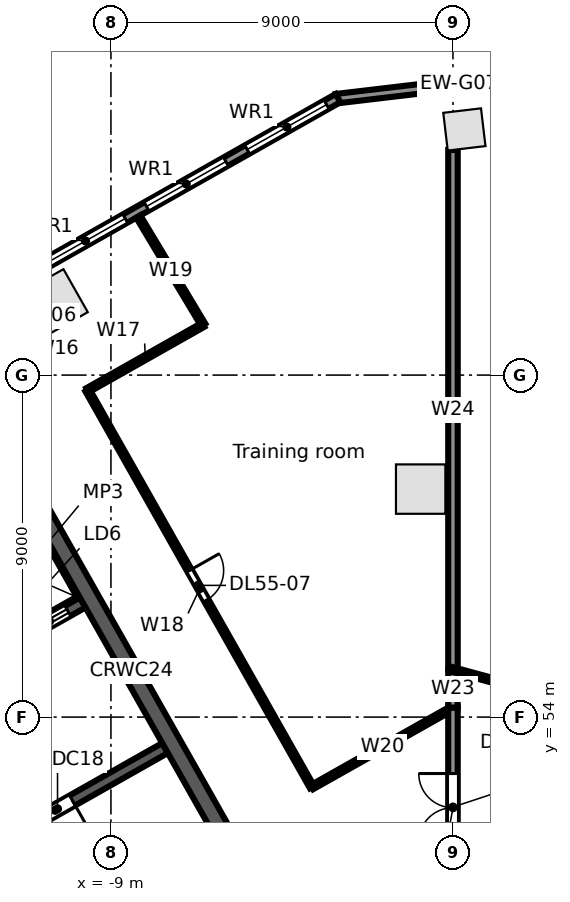
"""IFC4 building model, lengths in metres.
Left out: names, types, materials, properties, quantities, classifications, styles, units other than length and angle.
Written with IfcOpenShell. Run it as: python <this file> out.ifc"""

import sys

from ifc_helpers import new_model, si_unit, direction, frame, frame_2d, origin, origin_2d, place, context, subcontext, project, spatial, rectangle, extrude, element, fill, save


model = new_model("IFC4")
c1 = context("Model", 3, precision=1e-05, world=origin(), true_north=direction((0.0, 1.0)))
c2 = subcontext(c1, "Body", "Model", "MODEL_VIEW")
j1 = project(units=[si_unit("LENGTHUNIT", "METRE"), si_unit("PLANEANGLEUNIT", "RADIAN")], contexts=[c1])
p1 = place(None, origin())
s1 = spatial("IfcSite", under=j1, at=p1, CompositionType="ELEMENT")
p2 = place(p1, origin())
s2 = spatial("IfcBuilding", under=s1, at=p2, CompositionType="ELEMENT")
p3 = place(p2, frame((0.0, 0.0, 250.4)))
s3 = spatial("IfcBuildingStorey", under=s2, at=p3, CompositionType="ELEMENT", Elevation=250.4)
p4 = place(p3, frame((0.3, 69.464, 0.0), z_axis=(0.0, 0.0, 1.0), x_axis=(-0.993068456955, -0.117537397458, 0.0)))
e1 = element("IfcColumn", 1, at=p4, inside=s3, PredefinedType="COLUMN", context=c2, shape_type="SweptSolid", body=[
    extrude(rectangle(XDim=1.0, YDim=1.0, at=origin_2d()), origin(), (0.0, 0.0, 1.0), 3.9),
])
for number, where, z_axis, x_axis in (
    (2, (-10.495, 64.902, 0.0), (0.0, 0.0, 1.0), (-0.87, -0.492, 0.0)),
    (3, (-0.85, 60.0, 0.0), (0.0, 0.0, 1.0), (0.0, 1.0, 0.0)),
):
    element("IfcColumn", number, at=place(p3, frame(where, z_axis=z_axis, x_axis=x_axis)), inside=s3, PredefinedType="COLUMN", context=c2, shape_type="SweptSolid", body=[
        extrude(rectangle(XDim=1.3, YDim=1.3, at=origin_2d()), origin(), (0.0, 0.0, 1.0), 3.9),
    ])
p5 = place(p3, frame((-3.071, 70.273, 0.0), z_axis=(0.0, 0.0, 1.0), x_axis=(0.993064524962, 0.11757061394, 0.0)))
e4 = element("IfcWall", 4, at=p5, inside=s3, PredefinedType="STANDARD", context=c2, shape_type="SweptSolid", body=[
    extrude(rectangle(XDim=6.506, YDim=0.25, at=frame_2d((3.253, 0.0))), origin(), (0.0, 0.0, 1.0), 3.62),
])
p6 = place(p3, frame((-58.732, 38.771, 0.0), z_axis=(0.0, 0.0, 1.0), x_axis=(0.870354824205, 0.492425100887, 0.0)))
e5 = element("IfcWall", 5, at=p6, inside=s3, PredefinedType="STANDARD", context=c2, shape_type="SweptSolid", body=[
    extrude(rectangle(XDim=64.006, YDim=0.25, at=frame_2d((32.003, 0.0))), origin(), (0.0, 0.0, 1.0), 3.62),
])
p7 = place(p6, frame((61.259, 0.0, 0.8)))
e6 = element("IfcOpeningElement", 6, at=p7, cuts=e5, PredefinedType="OPENING", context=c2, shape_type="SweptSolid", body=[
    extrude(rectangle(XDim=2.4, YDim=2.2, at=frame_2d((1.2, 1.1))), frame((0.0, 0.135, 0.0), z_axis=(0.0, -1.0, 0.0), x_axis=(1.0, 0.0, 0.0)), (0.0, 0.0, 1.0), 0.27),
])
p8 = place(p6, frame((58.216, 0.0, 0.8)))
e7 = element("IfcOpeningElement", 7, at=p8, cuts=e5, PredefinedType="OPENING", context=c2, shape_type="SweptSolid", body=[
    extrude(rectangle(XDim=2.4, YDim=2.2, at=frame_2d((1.2, 1.1))), frame((0.0, 0.135, 0.0), z_axis=(0.0, -1.0, 0.0), x_axis=(1.0, 0.0, 0.0)), (0.0, 0.0, 1.0), 0.27),
])
p9 = place(p6, frame((55.173, 0.0, 0.8)))
e8 = element("IfcOpeningElement", 8, at=p9, cuts=e5, PredefinedType="OPENING", context=c2, shape_type="SweptSolid", body=[
    extrude(rectangle(XDim=2.4, YDim=2.2, at=frame_2d((1.2, 1.1))), frame((0.0, 0.135, 0.0), z_axis=(0.0, -1.0, 0.0), x_axis=(1.0, 0.0, 0.0)), (0.0, 0.0, 1.0), 0.27),
])
p10 = place(p6, frame((52.129, 0.0, 0.8)))
e9 = element("IfcOpeningElement", 9, at=p10, cuts=e5, PredefinedType="OPENING", context=c2, shape_type="SweptSolid", body=[
    extrude(rectangle(XDim=2.4, YDim=2.2, at=frame_2d((1.2, 1.1))), frame((0.0, 0.135, 0.0), z_axis=(0.0, -1.0, 0.0), x_axis=(1.0, 0.0, 0.0)), (0.0, 0.0, 1.0), 0.27),
])
p11 = place(p6, frame((49.086, 0.0, 0.8)))
e10 = element("IfcOpeningElement", 10, at=p11, cuts=e5, PredefinedType="OPENING", context=c2, shape_type="SweptSolid", body=[
    extrude(rectangle(XDim=2.4, YDim=2.2, at=frame_2d((1.2, 1.1))), frame((0.0, 0.135, 0.0), z_axis=(0.0, -1.0, 0.0), x_axis=(1.0, 0.0, 0.0)), (0.0, 0.0, 1.0), 0.27),
])
p12 = place(p6, frame((46.043, 0.0, 0.8)))
e11 = element("IfcOpeningElement", 11, at=p12, cuts=e5, PredefinedType="OPENING", context=c2, shape_type="SweptSolid", body=[
    extrude(rectangle(XDim=2.4, YDim=2.2, at=frame_2d((1.2, 1.1))), frame((0.0, 0.135, 0.0), z_axis=(0.0, -1.0, 0.0), x_axis=(1.0, 0.0, 0.0)), (0.0, 0.0, 1.0), 0.27),
])
p13 = place(p6, frame((43.0, 0.0, 0.8)))
e12 = element("IfcOpeningElement", 12, at=p13, cuts=e5, PredefinedType="OPENING", context=c2, shape_type="SweptSolid", body=[
    extrude(rectangle(XDim=2.4, YDim=2.2, at=frame_2d((1.2, 1.1))), frame((0.0, 0.135, 0.0), z_axis=(0.0, -1.0, 0.0), x_axis=(1.0, 0.0, 0.0)), (0.0, 0.0, 1.0), 0.27),
])
p14 = place(p6, frame((39.956, 0.0, 0.8)))
e13 = element("IfcOpeningElement", 13, at=p14, cuts=e5, PredefinedType="OPENING", context=c2, shape_type="SweptSolid", body=[
    extrude(rectangle(XDim=2.4, YDim=2.2, at=frame_2d((1.2, 1.1))), frame((0.0, 0.135, 0.0), z_axis=(0.0, -1.0, 0.0), x_axis=(1.0, 0.0, 0.0)), (0.0, 0.0, 1.0), 0.27),
])
p15 = place(p6, frame((36.913, 0.0, 0.8)))
e14 = element("IfcOpeningElement", 14, at=p15, cuts=e5, PredefinedType="OPENING", context=c2, shape_type="SweptSolid", body=[
    extrude(rectangle(XDim=2.4, YDim=2.2, at=frame_2d((1.2, 1.1))), frame((0.0, 0.135, 0.0), z_axis=(0.0, -1.0, 0.0), x_axis=(1.0, 0.0, 0.0)), (0.0, 0.0, 1.0), 0.27),
])
p16 = place(p6, frame((33.87, 0.0, 0.8)))
e15 = element("IfcOpeningElement", 15, at=p16, cuts=e5, PredefinedType="OPENING", context=c2, shape_type="SweptSolid", body=[
    extrude(rectangle(XDim=2.4, YDim=2.2, at=frame_2d((1.2, 1.1))), frame((0.0, 0.135, 0.0), z_axis=(0.0, -1.0, 0.0), x_axis=(1.0, 0.0, 0.0)), (0.0, 0.0, 1.0), 0.27),
])
p17 = place(p6, frame((30.826, 0.0, 0.8)))
e16 = element("IfcOpeningElement", 16, at=p17, cuts=e5, PredefinedType="OPENING", context=c2, shape_type="SweptSolid", body=[
    extrude(rectangle(XDim=2.4, YDim=2.2, at=frame_2d((1.2, 1.1))), frame((0.0, 0.135, 0.0), z_axis=(0.0, -1.0, 0.0), x_axis=(1.0, 0.0, 0.0)), (0.0, 0.0, 1.0), 0.27),
])
p18 = place(p6, frame((27.783, 0.0, 0.8)))
e17 = element("IfcOpeningElement", 17, at=p18, cuts=e5, PredefinedType="OPENING", context=c2, shape_type="SweptSolid", body=[
    extrude(rectangle(XDim=2.4, YDim=2.2, at=frame_2d((1.2, 1.1))), frame((0.0, 0.135, 0.0), z_axis=(0.0, -1.0, 0.0), x_axis=(1.0, 0.0, 0.0)), (0.0, 0.0, 1.0), 0.27),
])
p19 = place(p6, frame((24.74, 0.0, 0.8)))
e18 = element("IfcOpeningElement", 18, at=p19, cuts=e5, PredefinedType="OPENING", context=c2, shape_type="SweptSolid", body=[
    extrude(rectangle(XDim=2.4, YDim=2.2, at=frame_2d((1.2, 1.1))), frame((0.0, 0.135, 0.0), z_axis=(0.0, -1.0, 0.0), x_axis=(1.0, 0.0, 0.0)), (0.0, 0.0, 1.0), 0.27),
])
p20 = place(p6, frame((21.696, 0.0, 0.8)))
e19 = element("IfcOpeningElement", 19, at=p20, cuts=e5, PredefinedType="OPENING", context=c2, shape_type="SweptSolid", body=[
    extrude(rectangle(XDim=2.4, YDim=2.2, at=frame_2d((1.2, 1.1))), frame((0.0, 0.135, 0.0), z_axis=(0.0, -1.0, 0.0), x_axis=(1.0, 0.0, 0.0)), (0.0, 0.0, 1.0), 0.27),
])
p21 = place(p6, frame((18.653, 0.0, 0.8)))
e20 = element("IfcOpeningElement", 20, at=p21, cuts=e5, PredefinedType="OPENING", context=c2, shape_type="SweptSolid", body=[
    extrude(rectangle(XDim=2.4, YDim=2.2, at=frame_2d((1.2, 1.1))), frame((0.0, 0.135, 0.0), z_axis=(0.0, -1.0, 0.0), x_axis=(1.0, 0.0, 0.0)), (0.0, 0.0, 1.0), 0.27),
])
p22 = place(p6, frame((15.61, 0.0, 0.8)))
e21 = element("IfcOpeningElement", 21, at=p22, cuts=e5, PredefinedType="OPENING", context=c2, shape_type="SweptSolid", body=[
    extrude(rectangle(XDim=2.4, YDim=2.2, at=frame_2d((1.2, 1.1))), frame((0.0, 0.135, 0.0), z_axis=(0.0, -1.0, 0.0), x_axis=(1.0, 0.0, 0.0)), (0.0, 0.0, 1.0), 0.27),
])
p23 = place(p6, frame((12.567, 0.0, 0.8)))
e22 = element("IfcOpeningElement", 22, at=p23, cuts=e5, PredefinedType="OPENING", context=c2, shape_type="SweptSolid", body=[
    extrude(rectangle(XDim=2.4, YDim=2.2, at=frame_2d((1.2, 1.1))), frame((0.0, 0.135, 0.0), z_axis=(0.0, -1.0, 0.0), x_axis=(1.0, 0.0, 0.0)), (0.0, 0.0, 1.0), 0.27),
])
p24 = place(p6, frame((9.523, 0.0, 0.8)))
e23 = element("IfcOpeningElement", 23, at=p24, cuts=e5, PredefinedType="OPENING", context=c2, shape_type="SweptSolid", body=[
    extrude(rectangle(XDim=2.4, YDim=2.2, at=frame_2d((1.2, 1.1))), frame((0.0, 0.135, 0.0), z_axis=(0.0, -1.0, 0.0), x_axis=(1.0, 0.0, 0.0)), (0.0, 0.0, 1.0), 0.27),
])
p25 = place(p6, frame((6.48, 0.0, 0.8)))
e24 = element("IfcOpeningElement", 24, at=p25, cuts=e5, PredefinedType="OPENING", context=c2, shape_type="SweptSolid", body=[
    extrude(rectangle(XDim=2.4, YDim=2.2, at=frame_2d((1.2, 1.1))), frame((0.0, 0.135, 0.0), z_axis=(0.0, -1.0, 0.0), x_axis=(1.0, 0.0, 0.0)), (0.0, 0.0, 1.0), 0.27),
])
p26 = place(p6, frame((3.437, 0.0, 0.8)))
e25 = element("IfcOpeningElement", 25, at=p26, cuts=e5, PredefinedType="OPENING", context=c2, shape_type="SweptSolid", body=[
    extrude(rectangle(XDim=2.4, YDim=2.2, at=frame_2d((1.2, 1.1))), frame((0.0, 0.135, 0.0), z_axis=(0.0, -1.0, 0.0), x_axis=(1.0, 0.0, 0.0)), (0.0, 0.0, 1.0), 0.27),
])
p27 = place(p6, frame((0.393, 0.0, 0.8)))
e26 = element("IfcOpeningElement", 26, at=p27, cuts=e5, PredefinedType="OPENING", context=c2, shape_type="SweptSolid", body=[
    extrude(rectangle(XDim=2.4, YDim=2.2, at=frame_2d((1.2, 1.1))), frame((0.0, 0.135, 0.0), z_axis=(0.0, -1.0, 0.0), x_axis=(1.0, 0.0, 0.0)), (0.0, 0.0, 1.0), 0.27),
])
p28 = place(p3, frame((-13.365, 49.911, 0.0), z_axis=(0.0, 0.0, 1.0), x_axis=(0.870352159619, 0.492429810477, 0.0)))
e27 = element("IfcWall", 27, at=p28, inside=s3, PredefinedType="SOLIDWALL", context=c2, shape_type="SweptSolid", body=[
    extrude(rectangle(XDim=6.65, YDim=0.3, at=frame_2d((3.325, 0.0))), origin(), (0.0, 0.0, 1.0), 3.62),
])
p29 = place(p28, frame((2.95, 0.0, 0.0)))
e28 = element("IfcOpeningElement", 28, at=p29, cuts=e27, PredefinedType="OPENING", context=c2, shape_type="SweptSolid", body=[
    extrude(rectangle(XDim=0.9, YDim=2.1, at=frame_2d((0.45, 1.05))), frame((0.0, 0.16, 0.0), z_axis=(0.0, -1.0, 0.0), x_axis=(1.0, 0.0, 0.0)), (0.0, 0.0, 1.0), 0.32),
])
p30 = place(p3, frame((-15.618, 53.691, 0.0), z_axis=(0.0, 0.0, 1.0), x_axis=(0.870358646884, 0.492418344291, 0.0)))
e29 = element("IfcWall", 29, at=p30, inside=s3, PredefinedType="SOLIDWALL", context=c2, shape_type="SweptSolid", body=[
    extrude(rectangle(XDim=6.75, YDim=0.3, at=frame_2d((3.375, 0.0))), origin(), (0.0, 0.0, 1.0), 3.62),
])
p31 = place(p30, frame((0.6, 0.0, 0.0)))
e30 = element("IfcOpeningElement", 30, at=p31, cuts=e29, PredefinedType="OPENING", context=c2, shape_type="SweptSolid", body=[
    extrude(rectangle(XDim=1.1, YDim=2.1, at=frame_2d((0.55, 1.05))), frame((0.0, 0.16, 0.0), z_axis=(0.0, -1.0, 0.0), x_axis=(1.0, 0.0, 0.0)), (0.0, 0.0, 1.0), 0.32),
])
p32 = place(p30, frame((2.9, 0.0, 0.0)))
e31 = element("IfcOpeningElement", 31, at=p32, cuts=e29, PredefinedType="OPENING", context=c2, shape_type="SweptSolid", body=[
    extrude(rectangle(XDim=1.1, YDim=2.1, at=frame_2d((0.55, 1.05))), frame((0.0, 0.16, 0.0), z_axis=(0.0, -1.0, 0.0), x_axis=(1.0, 0.0, 0.0)), (0.0, 0.0, 1.0), 0.32),
])
p33 = place(p30, frame((5.2, 0.0, 0.0)))
e32 = element("IfcOpeningElement", 32, at=p33, cuts=e29, PredefinedType="OPENING", context=c2, shape_type="SweptSolid", body=[
    extrude(rectangle(XDim=1.1, YDim=2.1, at=frame_2d((0.55, 1.05))), frame((0.0, 0.16, 0.0), z_axis=(0.0, -1.0, 0.0), x_axis=(1.0, 0.0, 0.0)), (0.0, 0.0, 1.0), 0.32),
])
p34 = place(p3, frame((-11.689, 60.912, 0.0), z_axis=(0.0, 0.0, 1.0), x_axis=(0.492421378713, -0.870356930107, 0.0)))
e33 = element("IfcWall", 33, at=p34, inside=s3, PredefinedType="SOLIDWALL", context=c2, shape_type="SweptSolid", body=[
    extrude(rectangle(XDim=13.1, YDim=0.45, at=frame_2d((6.55, 0.0))), origin(), (0.0, 0.0, 1.0), 3.62),
])
p35 = place(p3, frame((-9.618, 62.601, 0.0), z_axis=(0.0, 0.0, 1.0), x_axis=(0.870402970255, 0.492339993675, 0.0)))
e34 = element("IfcWall", 34, at=p35, inside=s3, PredefinedType="PARTITIONING", context=c2, shape_type="SweptSolid", body=[
    extrude(rectangle(XDim=3.5, YDim=0.125, at=frame_2d((1.75, 0.0))), origin(), (0.0, 0.0, 1.0), 2.9),
])
p36 = place(p3, frame((-9.618, 62.601, 0.0), z_axis=(0.0, 0.0, 1.0), x_axis=(0.492420575123, -0.870357384754, 0.0)))
e35 = element("IfcWall", 35, at=p36, inside=s3, PredefinedType="PARTITIONING", context=c2, shape_type="SweptSolid", body=[
    extrude(rectangle(XDim=12.0, YDim=0.125, at=frame_2d((6.0, 0.0))), origin(), (0.0, 0.0, 1.0), 2.8),
])
p37 = place(p36, frame((5.45, 0.0, 0.0)))
e36 = element("IfcOpeningElement", 36, at=p37, cuts=e35, PredefinedType="OPENING", context=c2, shape_type="SweptSolid", body=[
    extrude(rectangle(XDim=0.9, YDim=2.1, at=frame_2d((0.45, 1.05))), frame((0.0, 0.073, 0.0), z_axis=(0.0, -1.0, 0.0), x_axis=(1.0, 0.0, 0.0)), (0.0, 0.0, 1.0), 0.145),
])
p38 = place(p3, frame((-8.28, 67.172, 0.0), z_axis=(0.0, 0.0, 1.0), x_axis=(0.514301147355, -0.857609660527, 0.0)))
e37 = element("IfcWall", 37, at=p38, inside=s3, PredefinedType="PARTITIONING", context=c2, shape_type="SweptSolid", body=[
    extrude(rectangle(XDim=3.321, YDim=0.125, at=frame_2d((1.661, 0.0))), origin(), (0.0, 0.0, 1.0), 2.9),
])
p39 = place(p3, frame((-3.709, 52.157, 0.0), z_axis=(0.0, 0.0, 1.0), x_axis=(0.870901087888, 0.491458335075, 0.0)))
e38 = element("IfcWall", 38, at=p39, inside=s3, PredefinedType="PARTITIONING", context=c2, shape_type="SweptSolid", body=[
    extrude(rectangle(XDim=4.259, YDim=0.125, at=frame_2d((2.129, 0.0))), origin(), (0.0, 0.0, 1.0), 2.8),
])
p40 = place(p3, frame((0.0, 49.015, 0.0), z_axis=(0.0, 0.0, 1.0), x_axis=(0.0, 1.0, 0.0)))
e39 = element("IfcWall", 39, at=p40, inside=s3, PredefinedType="PARTITIONING", context=c2, shape_type="SweptSolid", body=[
    extrude(rectangle(XDim=5.235, YDim=0.25, at=frame_2d((2.618, 0.0))), origin(), (0.0, 0.0, 1.0), 3.62),
])
p41 = place(p40, frame((1.7, 0.0, 0.0)))
e40 = element("IfcOpeningElement", 40, at=p41, cuts=e39, PredefinedType="OPENING", context=c2, shape_type="SweptSolid", body=[
    extrude(rectangle(XDim=1.8, YDim=2.1, at=frame_2d((0.9, 1.05))), frame((0.0, 0.135, 0.0), z_axis=(0.0, -1.0, 0.0), x_axis=(1.0, 0.0, 0.0)), (0.0, 0.0, 1.0), 0.27),
])
p42 = place(p3, frame((0.0, 54.25, 0.0), z_axis=(0.0, 0.0, 1.0), x_axis=(0.0, 1.0, 0.0)))
e41 = element("IfcWall", 41, at=p42, inside=s3, PredefinedType="PARTITIONING", context=c2, shape_type="SweptSolid", body=[
    extrude(rectangle(XDim=1.0, YDim=0.25, at=frame_2d((0.5, 0.0))), origin(), (0.0, 0.0, 1.0), 3.62),
])
p43 = place(p3, frame((0.0, 55.25, 0.0), z_axis=(0.0, 0.0, 1.0), x_axis=(0.0, 1.0, 0.0)))
e42 = element("IfcWall", 42, at=p43, inside=s3, PredefinedType="PARTITIONING", context=c2, shape_type="SweptSolid", body=[
    extrude(rectangle(XDim=13.675, YDim=0.25, at=frame_2d((6.837, 0.0))), origin(), (0.0, 0.0, 1.0), 2.8),
])
p44 = place(p3, frame((0.0, 55.25, 0.0), z_axis=(0.0, 0.0, 1.0), x_axis=(0.965016778836, -0.262188132005, 0.0)))
e43 = element("IfcWall", 43, at=p44, inside=s3, PredefinedType="PARTITIONING", context=c2, shape_type="SweptSolid", body=[
    extrude(rectangle(XDim=4.691, YDim=0.125, at=frame_2d((2.346, 0.0))), origin(), (0.0, 0.0, 1.0), 3.62),
])
p45 = place(p44, frame((1.95, 0.0, 0.0)))
e44 = element("IfcOpeningElement", 44, at=p45, cuts=e43, PredefinedType="OPENING", context=c2, shape_type="SweptSolid", body=[
    extrude(rectangle(XDim=0.9, YDim=2.1, at=frame_2d((0.45, 1.05))), frame((0.0, 0.073, 0.0), z_axis=(0.0, -1.0, 0.0), x_axis=(1.0, 0.0, 0.0)), (0.0, 0.0, 1.0), 0.145),
])
p46 = place(p7, origin())
e45 = element("IfcWindow", 45, at=p46, inside=s3, PartitioningType="SINGLE_PANEL", PredefinedType="WINDOW", context=c2, shape_type="SweptSolid", body=[
    extrude(rectangle(XDim=2.4, YDim=2.2, at=frame_2d((1.2, 1.1))), frame((0.0, 0.03, 0.0), z_axis=(0.0, -1.0, 0.0), x_axis=(1.0, 0.0, 0.0)), (0.0, 0.0, 1.0), 0.06),
])
fill(e6, e45)
p47 = place(p8, origin())
e46 = element("IfcWindow", 46, at=p47, inside=s3, PartitioningType="SINGLE_PANEL", PredefinedType="WINDOW", context=c2, shape_type="SweptSolid", body=[
    extrude(rectangle(XDim=2.4, YDim=2.2, at=frame_2d((1.2, 1.1))), frame((0.0, 0.03, 0.0), z_axis=(0.0, -1.0, 0.0), x_axis=(1.0, 0.0, 0.0)), (0.0, 0.0, 1.0), 0.06),
])
fill(e7, e46)
p48 = place(p9, origin())
e47 = element("IfcWindow", 47, at=p48, inside=s3, PartitioningType="SINGLE_PANEL", PredefinedType="WINDOW", context=c2, shape_type="SweptSolid", body=[
    extrude(rectangle(XDim=2.4, YDim=2.2, at=frame_2d((1.2, 1.1))), frame((0.0, 0.03, 0.0), z_axis=(0.0, -1.0, 0.0), x_axis=(1.0, 0.0, 0.0)), (0.0, 0.0, 1.0), 0.06),
])
fill(e8, e47)
p49 = place(p33, origin())
e48 = element("IfcDoor", 48, at=p49, inside=s3, OperationType="DOUBLE_DOOR_SLIDING", PredefinedType="DOOR", context=c2, shape_type="SweptSolid", body=[
    extrude(rectangle(XDim=1.1, YDim=2.1, at=frame_2d((0.55, 1.05))), frame((0.0, 0.025, 0.0), z_axis=(0.0, -1.0, 0.0), x_axis=(1.0, 0.0, 0.0)), (0.0, 0.0, 1.0), 0.05),
])
fill(e32, e48)
p50 = place(p29, frame((0.9, 0.0, 0.0), z_axis=(0.0, 0.0, 1.0), x_axis=(-1.0, 0.0, 0.0)))
e49 = element("IfcDoor", 49, at=p50, inside=s3, OperationType="SINGLE_SWING_LEFT", PredefinedType="DOOR", context=c2, shape_type="SweptSolid", body=[
    extrude(rectangle(XDim=0.9, YDim=2.1, at=frame_2d((0.45, 1.05))), frame((0.0, 0.025, 0.0), z_axis=(0.0, -1.0, 0.0), x_axis=(1.0, 0.0, 0.0)), (0.0, 0.0, 1.0), 0.05),
])
fill(e28, e49)
p51 = place(p37, origin())
e50 = element("IfcDoor", 50, at=p51, inside=s3, OperationType="SINGLE_SWING_LEFT", PredefinedType="DOOR", context=c2, shape_type="SweptSolid", body=[
    extrude(rectangle(XDim=0.9, YDim=2.1, at=frame_2d((0.45, 1.05))), frame((0.0, 0.025, 0.0), z_axis=(0.0, -1.0, 0.0), x_axis=(1.0, 0.0, 0.0)), (0.0, 0.0, 1.0), 0.05),
])
fill(e36, e50)
p52 = place(p41, origin())
e51 = element("IfcDoor", 51, at=p52, inside=s3, OperationType="DOUBLE_DOOR_SINGLE_SWING", PredefinedType="DOOR", context=c2, shape_type="SweptSolid", body=[
    extrude(rectangle(XDim=1.8, YDim=2.1, at=frame_2d((0.9, 1.05))), frame((0.0, 0.025, 0.0), z_axis=(0.0, -1.0, 0.0), x_axis=(1.0, 0.0, 0.0)), (0.0, 0.0, 1.0), 0.05),
])
fill(e40, e51)
save(model, sys.argv[1])
